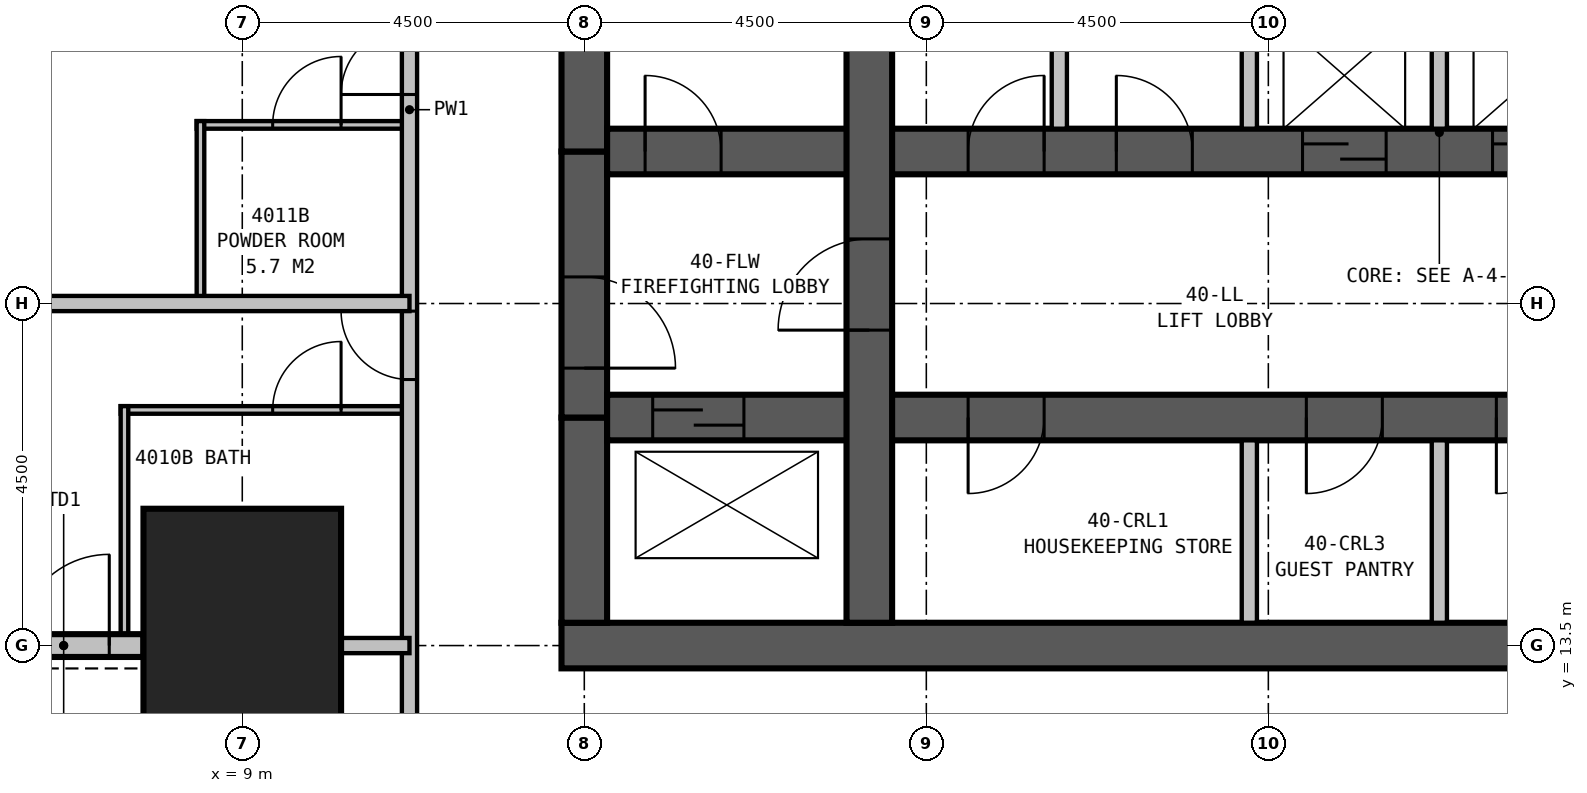
"""IFC4 building model, lengths in metres.
Left out: names, types, materials, properties, quantities, classifications, styles, units other than length and angle.
Written with IfcOpenShell. Run it as: python <this file> out.ifc"""

import sys

from ifc_helpers import new_model, si_unit, direction, frame, frame_2d, origin, origin_2d, place, context, subcontext, project, spatial, rectangle, extrude, element, fill, save


model = new_model("IFC4")
c1 = context("Model", 3, precision=1e-05, world=origin(), true_north=direction((0.0, 1.0)))
c2 = subcontext(c1, "Body", "Model", "MODEL_VIEW")
j1 = project(units=[si_unit("LENGTHUNIT", "METRE"), si_unit("PLANEANGLEUNIT", "RADIAN")], contexts=[c1])
p1 = place(None, origin())
s1 = spatial("IfcSite", under=j1, at=p1, CompositionType="ELEMENT")
p2 = place(p1, origin())
s2 = spatial("IfcBuilding", under=s1, at=p2, CompositionType="ELEMENT")
p3 = place(p2, frame((0.0, 0.0, 157.9)))
s3 = spatial("IfcBuildingStorey", under=s2, at=p3, CompositionType="ELEMENT", Elevation=157.9)
p4 = place(p3, frame((9.0, 13.5, 0.0), z_axis=(0.0, 0.0, 1.0), x_axis=(1.0, 0.0, 0.0)))
e1 = element("IfcColumn", 1, at=p4, inside=s3, PredefinedType="COLUMN", context=c2, shape_type="SweptSolid", body=[
    extrude(rectangle(XDim=2.6, YDim=3.6, at=origin_2d()), origin(), (0.0, 0.0, 1.0), 4.5),
])
p5 = place(p3, frame((13.2, 13.5, 0.0), z_axis=(0.0, 0.0, 1.0), x_axis=(1.0, 0.0, 0.0)))
e2 = element("IfcWall", 2, at=p5, inside=s3, PredefinedType="SHEAR", context=c2, shape_type="SweptSolid", body=[
    extrude(rectangle(XDim=23.1, YDim=0.6, at=frame_2d((11.55, 0.0))), origin(), (0.0, 0.0, 1.0), 4.5),
])
p6 = place(p3, frame((17.25, 13.8, 0.0), z_axis=(0.0, 0.0, 1.0), x_axis=(0.0, 1.0, 0.0)))
e3 = element("IfcWall", 3, at=p6, inside=s3, PredefinedType="SHEAR", context=c2, shape_type="SweptSolid", body=[
    extrude(rectangle(XDim=12.9, YDim=0.6, at=frame_2d((6.45, 0.0))), origin(), (0.0, 0.0, 1.0), 4.5),
])
p7 = place(p6, frame((3.85, 0.0, 0.0)))
e4 = element("IfcOpeningElement", 4, at=p7, cuts=e3, PredefinedType="OPENING", context=c2, shape_type="SweptSolid", body=[
    extrude(rectangle(XDim=1.2, YDim=2.1, at=frame_2d((0.6, 1.05))), frame((0.0, 0.31, 0.0), z_axis=(0.0, -1.0, 0.0), x_axis=(1.0, 0.0, 0.0)), (0.0, 0.0, 1.0), 0.62),
])
p8 = place(p3, frame((13.8, 16.5, 0.0), z_axis=(0.0, 0.0, 1.0), x_axis=(1.0, 0.0, 0.0)))
e5 = element("IfcWall", 5, at=p8, inside=s3, PredefinedType="SHEAR", context=c2, shape_type="SweptSolid", body=[
    extrude(rectangle(XDim=21.9, YDim=0.6, at=frame_2d((10.95, 0.0))), origin(), (0.0, 0.0, 1.0), 4.5),
])
p9 = place(p8, frame((5.75, 0.0, 0.0), z_axis=(0.0, 0.0, 1.0), x_axis=(-1.0, 0.0, 0.0)))
e6 = element("IfcOpeningElement", 6, at=p9, cuts=e5, PredefinedType="OPENING", context=c2, shape_type="SweptSolid", body=[
    extrude(rectangle(XDim=1.0, YDim=2.1, at=frame_2d((0.5, 1.05))), frame((0.0, 0.31, 0.0), z_axis=(0.0, -1.0, 0.0), x_axis=(1.0, 0.0, 0.0)), (0.0, 0.0, 1.0), 0.62),
])
p10 = place(p8, frame((10.2, 0.0, 0.0), z_axis=(0.0, 0.0, 1.0), x_axis=(-1.0, 0.0, 0.0)))
e7 = element("IfcOpeningElement", 7, at=p10, cuts=e5, PredefinedType="OPENING", context=c2, shape_type="SweptSolid", body=[
    extrude(rectangle(XDim=1.0, YDim=2.1, at=frame_2d((0.5, 1.05))), frame((0.0, 0.31, 0.0), z_axis=(0.0, -1.0, 0.0), x_axis=(1.0, 0.0, 0.0)), (0.0, 0.0, 1.0), 0.62),
])
p11 = place(p8, frame((12.7, 0.0, 0.0), z_axis=(0.0, 0.0, 1.0), x_axis=(-1.0, 0.0, 0.0)))
e8 = element("IfcOpeningElement", 8, at=p11, cuts=e5, PredefinedType="OPENING", context=c2, shape_type="SweptSolid", body=[
    extrude(rectangle(XDim=1.0, YDim=2.1, at=frame_2d((0.5, 1.05))), frame((0.0, 0.31, 0.0), z_axis=(0.0, -1.0, 0.0), x_axis=(1.0, 0.0, 0.0)), (0.0, 0.0, 1.0), 0.62),
])
p12 = place(p8, frame((17.15, 0.0, 0.0), z_axis=(0.0, 0.0, 1.0), x_axis=(-1.0, 0.0, 0.0)))
e9 = element("IfcOpeningElement", 9, at=p12, cuts=e5, PredefinedType="OPENING", context=c2, shape_type="SweptSolid", body=[
    extrude(rectangle(XDim=1.0, YDim=2.1, at=frame_2d((0.5, 1.05))), frame((0.0, 0.31, 0.0), z_axis=(0.0, -1.0, 0.0), x_axis=(1.0, 0.0, 0.0)), (0.0, 0.0, 1.0), 0.62),
])
p13 = place(p8, frame((0.6, 0.0, 0.0)))
e10 = element("IfcOpeningElement", 10, at=p13, cuts=e5, PredefinedType="OPENING", context=c2, shape_type="SweptSolid", body=[
    extrude(rectangle(XDim=1.2, YDim=2.1, at=frame_2d((0.6, 1.05))), frame((0.0, 0.31, 0.0), z_axis=(0.0, -1.0, 0.0), x_axis=(1.0, 0.0, 0.0)), (0.0, 0.0, 1.0), 0.62),
])
p14 = place(p8, frame((19.6, 0.0, 0.0)))
e11 = element("IfcOpeningElement", 11, at=p14, cuts=e5, PredefinedType="OPENING", context=c2, shape_type="SweptSolid", body=[
    extrude(rectangle(XDim=1.2, YDim=2.1, at=frame_2d((0.6, 1.05))), frame((0.0, 0.31, 0.0), z_axis=(0.0, -1.0, 0.0), x_axis=(1.0, 0.0, 0.0)), (0.0, 0.0, 1.0), 0.62),
])
p15 = place(p3, frame((13.8, 20.0, 0.0), z_axis=(0.0, 0.0, 1.0), x_axis=(1.0, 0.0, 0.0)))
e12 = element("IfcWall", 12, at=p15, inside=s3, PredefinedType="SHEAR", context=c2, shape_type="SweptSolid", body=[
    extrude(rectangle(XDim=21.9, YDim=0.6, at=frame_2d((10.95, 0.0))), origin(), (0.0, 0.0, 1.0), 4.5),
])
p16 = place(p15, frame((0.5, 0.0, 0.0)))
e13 = element("IfcOpeningElement", 13, at=p16, cuts=e12, PredefinedType="OPENING", context=c2, shape_type="SweptSolid", body=[
    extrude(rectangle(XDim=1.0, YDim=2.1, at=frame_2d((0.5, 1.05))), frame((0.0, 0.31, 0.0), z_axis=(0.0, -1.0, 0.0), x_axis=(1.0, 0.0, 0.0)), (0.0, 0.0, 1.0), 0.62),
])
p17 = place(p15, frame((20.5, 0.0, 0.0)))
e14 = element("IfcOpeningElement", 14, at=p17, cuts=e12, PredefinedType="OPENING", context=c2, shape_type="SweptSolid", body=[
    extrude(rectangle(XDim=1.0, YDim=2.1, at=frame_2d((0.5, 1.05))), frame((0.0, 0.31, 0.0), z_axis=(0.0, -1.0, 0.0), x_axis=(1.0, 0.0, 0.0)), (0.0, 0.0, 1.0), 0.62),
])
p18 = place(p15, frame((9.15, 0.0, 0.0)))
e15 = element("IfcOpeningElement", 15, at=p18, cuts=e12, PredefinedType="OPENING", context=c2, shape_type="SweptSolid", body=[
    extrude(rectangle(XDim=1.1, YDim=2.1, at=frame_2d((0.55, 1.05))), frame((0.0, 0.31, 0.0), z_axis=(0.0, -1.0, 0.0), x_axis=(1.0, 0.0, 0.0)), (0.0, 0.0, 1.0), 0.62),
])
p19 = place(p15, frame((11.65, 0.0, 0.0)))
e16 = element("IfcOpeningElement", 16, at=p19, cuts=e12, PredefinedType="OPENING", context=c2, shape_type="SweptSolid", body=[
    extrude(rectangle(XDim=1.1, YDim=2.1, at=frame_2d((0.55, 1.05))), frame((0.0, 0.31, 0.0), z_axis=(0.0, -1.0, 0.0), x_axis=(1.0, 0.0, 0.0)), (0.0, 0.0, 1.0), 0.62),
])
p20 = place(p15, frame((14.15, 0.0, 0.0)))
e17 = element("IfcOpeningElement", 17, at=p20, cuts=e12, PredefinedType="OPENING", context=c2, shape_type="SweptSolid", body=[
    extrude(rectangle(XDim=1.1, YDim=2.1, at=frame_2d((0.55, 1.05))), frame((0.0, 0.31, 0.0), z_axis=(0.0, -1.0, 0.0), x_axis=(1.0, 0.0, 0.0)), (0.0, 0.0, 1.0), 0.62),
])
p21 = place(p15, frame((16.65, 0.0, 0.0)))
e18 = element("IfcOpeningElement", 18, at=p21, cuts=e12, PredefinedType="OPENING", context=c2, shape_type="SweptSolid", body=[
    extrude(rectangle(XDim=1.1, YDim=2.1, at=frame_2d((0.55, 1.05))), frame((0.0, 0.31, 0.0), z_axis=(0.0, -1.0, 0.0), x_axis=(1.0, 0.0, 0.0)), (0.0, 0.0, 1.0), 0.62),
])
p22 = place(p15, frame((4.75, 0.0, 0.0)))
e19 = element("IfcOpeningElement", 19, at=p22, cuts=e12, PredefinedType="OPENING", context=c2, shape_type="SweptSolid", body=[
    extrude(rectangle(XDim=1.0, YDim=2.1, at=frame_2d((0.5, 1.05))), frame((0.0, 0.31, 0.0), z_axis=(0.0, -1.0, 0.0), x_axis=(1.0, 0.0, 0.0)), (0.0, 0.0, 1.0), 0.62),
])
p23 = place(p15, frame((6.7, 0.0, 0.0)))
e20 = element("IfcOpeningElement", 20, at=p23, cuts=e12, PredefinedType="OPENING", context=c2, shape_type="SweptSolid", body=[
    extrude(rectangle(XDim=1.0, YDim=2.1, at=frame_2d((0.5, 1.05))), frame((0.0, 0.31, 0.0), z_axis=(0.0, -1.0, 0.0), x_axis=(1.0, 0.0, 0.0)), (0.0, 0.0, 1.0), 0.62),
])
p24 = place(p3, frame((13.5, 26.7, 0.0), z_axis=(0.0, 0.0, 1.0), x_axis=(0.0, -1.0, 0.0)))
e21 = element("IfcWall", 21, at=p24, inside=s3, PredefinedType="SHEAR", context=c2, shape_type="SweptSolid", body=[
    extrude(rectangle(XDim=6.7, YDim=0.6, at=frame_2d((3.35, 0.0))), origin(), (0.0, 0.0, 1.0), 4.5),
])
p25 = place(p3, frame((13.5, 20.0, 0.0), z_axis=(0.0, 0.0, 1.0), x_axis=(0.0, -1.0, 0.0)))
e22 = element("IfcWall", 22, at=p25, inside=s3, PredefinedType="SHEAR", context=c2, shape_type="SweptSolid", body=[
    extrude(rectangle(XDim=3.5, YDim=0.6, at=frame_2d((1.75, 0.0))), origin(), (0.0, 0.0, 1.0), 4.5),
])
p26 = place(p25, frame((1.65, 0.0, 0.0)))
e23 = element("IfcOpeningElement", 23, at=p26, cuts=e22, PredefinedType="OPENING", context=c2, shape_type="SweptSolid", body=[
    extrude(rectangle(XDim=1.2, YDim=2.1, at=frame_2d((0.6, 1.05))), frame((0.0, 0.31, 0.0), z_axis=(0.0, -1.0, 0.0), x_axis=(1.0, 0.0, 0.0)), (0.0, 0.0, 1.0), 0.62),
])
p27 = place(p3, frame((13.5, 16.5, 0.0), z_axis=(0.0, 0.0, 1.0), x_axis=(0.0, -1.0, 0.0)))
e24 = element("IfcWall", 24, at=p27, inside=s3, PredefinedType="SHEAR", context=c2, shape_type="SweptSolid", body=[
    extrude(rectangle(XDim=2.7, YDim=0.6, at=frame_2d((1.35, 0.0))), origin(), (0.0, 0.0, 1.0), 4.5),
])
p28 = place(p3, frame((5.6, 13.5, 0.0), z_axis=(0.0, 0.0, 1.0), x_axis=(1.0, 0.0, 0.0)))
e25 = element("IfcWall", 25, at=p28, inside=s3, PredefinedType="STANDARD", context=c2, shape_type="SweptSolid", body=[
    extrude(rectangle(XDim=2.1, YDim=0.3, at=frame_2d((1.05, 0.0))), origin(), (0.0, 0.0, 1.0), 2.75),
])
p29 = place(p28, frame((0.45, 0.0, 0.0)))
e26 = element("IfcOpeningElement", 26, at=p29, cuts=e25, PredefinedType="OPENING", context=c2, shape_type="SweptSolid", body=[
    extrude(rectangle(XDim=1.2, YDim=2.4, at=frame_2d((0.6, 1.2))), frame((0.0, 0.16, 0.0), z_axis=(0.0, -1.0, 0.0), x_axis=(1.0, 0.0, 0.0)), (0.0, 0.0, 1.0), 0.32),
])
p30 = place(p3, frame((11.2, 11.2, 0.0), z_axis=(0.0, 0.0, 1.0), x_axis=(0.0, 1.0, 0.0)))
e27 = element("IfcWall", 27, at=p30, inside=s3, PredefinedType="PARTITIONING", context=c2, shape_type="SweptSolid", body=[
    extrude(rectangle(XDim=18.7, YDim=0.2, at=frame_2d((9.35, 0.0))), origin(), (0.0, 0.0, 1.0), 4.25),
])
p31 = place(p30, frame((5.8, 0.0, 0.0)))
e28 = element("IfcOpeningElement", 28, at=p31, cuts=e27, PredefinedType="OPENING", context=c2, shape_type="SweptSolid", body=[
    extrude(rectangle(XDim=0.9, YDim=2.1, at=frame_2d((0.45, 1.05))), frame((0.0, 0.11, 0.0), z_axis=(0.0, -1.0, 0.0), x_axis=(1.0, 0.0, 0.0)), (0.0, 0.0, 1.0), 0.22),
])
p32 = place(p30, frame((9.55, 0.0, 0.0)))
e29 = element("IfcOpeningElement", 29, at=p32, cuts=e27, PredefinedType="OPENING", context=c2, shape_type="SweptSolid", body=[
    extrude(rectangle(XDim=0.9, YDim=2.1, at=frame_2d((0.45, 1.05))), frame((0.0, 0.11, 0.0), z_axis=(0.0, -1.0, 0.0), x_axis=(1.0, 0.0, 0.0)), (0.0, 0.0, 1.0), 0.22),
])
p33 = place(p3, frame((11.2, 18.0, 0.0), z_axis=(0.0, 0.0, 1.0), x_axis=(-1.0, 0.0, 0.0)))
e30 = element("IfcWall", 30, at=p33, inside=s3, PredefinedType="PARTITIONING", context=c2, shape_type="SweptSolid", body=[
    extrude(rectangle(XDim=9.199, YDim=0.2, at=frame_2d((4.6, 0.0))), origin(), (0.0, 0.0, 1.0), 3.25),
])
p34 = place(p3, frame((7.45, 13.5, 0.0), z_axis=(0.0, 0.0, 1.0), x_axis=(0.0, 1.0, 0.0)))
e31 = element("IfcWall", 31, at=p34, inside=s3, PredefinedType="PLUMBINGWALL", context=c2, shape_type="SweptSolid", body=[
    extrude(rectangle(XDim=3.15, YDim=0.1, at=frame_2d((1.575, 0.0))), origin(), (0.0, 0.0, 1.0), 4.25),
])
p35 = place(p3, frame((11.2, 16.6, 0.0), z_axis=(0.0, 0.0, 1.0), x_axis=(-1.0, 0.0, 0.0)))
e32 = element("IfcWall", 32, at=p35, inside=s3, PredefinedType="PLUMBINGWALL", context=c2, shape_type="SweptSolid", body=[
    extrude(rectangle(XDim=3.8, YDim=0.1, at=frame_2d((1.9, 0.0))), origin(), (0.0, 0.0, 1.0), 4.25),
])
p36 = place(p35, frame((1.8, 0.0, 0.0), z_axis=(0.0, 0.0, 1.0), x_axis=(-1.0, 0.0, 0.0)))
e33 = element("IfcOpeningElement", 33, at=p36, cuts=e32, PredefinedType="OPENING", context=c2, shape_type="SweptSolid", body=[
    extrude(rectangle(XDim=0.9, YDim=2.1, at=frame_2d((0.45, 1.05))), frame((0.0, 0.06, 0.0), z_axis=(0.0, -1.0, 0.0), x_axis=(1.0, 0.0, 0.0)), (0.0, 0.0, 1.0), 0.12),
])
p37 = place(p3, frame((8.45, 18.0, 0.0), z_axis=(0.0, 0.0, 1.0), x_axis=(0.0, 1.0, 0.0)))
e34 = element("IfcWall", 34, at=p37, inside=s3, PredefinedType="PLUMBINGWALL", context=c2, shape_type="SweptSolid", body=[
    extrude(rectangle(XDim=2.4, YDim=0.1, at=frame_2d((1.2, 0.0))), origin(), (0.0, 0.0, 1.0), 4.25),
])
p38 = place(p3, frame((11.2, 20.35, 0.0), z_axis=(0.0, 0.0, 1.0), x_axis=(-1.0, 0.0, 0.0)))
e35 = element("IfcWall", 35, at=p38, inside=s3, PredefinedType="PLUMBINGWALL", context=c2, shape_type="SweptSolid", body=[
    extrude(rectangle(XDim=2.8, YDim=0.1, at=frame_2d((1.4, 0.0))), origin(), (0.0, 0.0, 1.0), 4.25),
])
p39 = place(p38, frame((1.8, 0.0, 0.0), z_axis=(0.0, 0.0, 1.0), x_axis=(-1.0, 0.0, 0.0)))
e36 = element("IfcOpeningElement", 36, at=p39, cuts=e35, PredefinedType="OPENING", context=c2, shape_type="SweptSolid", body=[
    extrude(rectangle(XDim=0.9, YDim=2.1, at=frame_2d((0.45, 1.05))), frame((0.0, 0.06, 0.0), z_axis=(0.0, -1.0, 0.0), x_axis=(1.0, 0.0, 0.0)), (0.0, 0.0, 1.0), 0.12),
])
p40 = place(p3, frame((11.2, 13.5, 0.0), z_axis=(0.0, 0.0, 1.0), x_axis=(-1.0, 0.0, 0.0)))
e37 = element("IfcWall", 37, at=p40, inside=s3, PredefinedType="PARTITIONING", context=c2, shape_type="SweptSolid", body=[
    extrude(rectangle(XDim=2.2, YDim=0.2, at=frame_2d((1.1, 0.0))), origin(), (0.0, 0.0, 1.0), 2.95),
])
p41 = place(p3, frame((19.75, 20.3, 0.0), z_axis=(0.0, 0.0, 1.0), x_axis=(0.0, 1.0, 0.0)))
e38 = element("IfcWall", 38, at=p41, inside=s3, PredefinedType="PARTITIONING", context=c2, shape_type="SweptSolid", body=[
    extrude(rectangle(XDim=3.1, YDim=0.2, at=frame_2d((1.55, 0.0))), origin(), (0.0, 0.0, 1.0), 4.25),
])
p42 = place(p3, frame((22.25, 13.8, 0.0), z_axis=(0.0, 0.0, 1.0), x_axis=(0.0, 1.0, 0.0)))
e39 = element("IfcWall", 39, at=p42, inside=s3, PredefinedType="PARTITIONING", context=c2, shape_type="SweptSolid", body=[
    extrude(rectangle(XDim=2.4, YDim=0.2, at=frame_2d((1.2, 0.0))), origin(), (0.0, 0.0, 1.0), 4.25),
])
p43 = place(p3, frame((22.25, 20.3, 0.0), z_axis=(0.0, 0.0, 1.0), x_axis=(0.0, 1.0, 0.0)))
e40 = element("IfcWall", 40, at=p43, inside=s3, PredefinedType="PARTITIONING", context=c2, shape_type="SweptSolid", body=[
    extrude(rectangle(XDim=3.1, YDim=0.2, at=frame_2d((1.55, 0.0))), origin(), (0.0, 0.0, 1.0), 4.25),
])
p44 = place(p3, frame((24.75, 13.8, 0.0), z_axis=(0.0, 0.0, 1.0), x_axis=(0.0, 1.0, 0.0)))
e41 = element("IfcWall", 41, at=p44, inside=s3, PredefinedType="PARTITIONING", context=c2, shape_type="SweptSolid", body=[
    extrude(rectangle(XDim=2.4, YDim=0.2, at=frame_2d((1.2, 0.0))), origin(), (0.0, 0.0, 1.0), 4.25),
])
p45 = place(p3, frame((24.75, 20.3, 0.0), z_axis=(0.0, 0.0, 1.0), x_axis=(0.0, 1.0, 0.0)))
e42 = element("IfcWall", 42, at=p45, inside=s3, PredefinedType="PARTITIONING", context=c2, shape_type="SweptSolid", body=[
    extrude(rectangle(XDim=3.1, YDim=0.2, at=frame_2d((1.55, 0.0))), origin(), (0.0, 0.0, 1.0), 4.25),
])
p46 = place(p29, origin())
e43 = element("IfcDoor", 43, at=p46, inside=s3, OperationType="SINGLE_SWING_RIGHT", PredefinedType="DOOR", context=c2, shape_type="SweptSolid", body=[
    extrude(rectangle(XDim=1.2, YDim=2.4, at=frame_2d((0.6, 1.2))), frame((0.0, 0.025, 0.0), z_axis=(0.0, -1.0, 0.0), x_axis=(1.0, 0.0, 0.0)), (0.0, 0.0, 1.0), 0.05),
])
fill(e26, e43)
p47 = place(p31, origin())
e44 = element("IfcDoor", 44, at=p47, inside=s3, OperationType="SINGLE_SWING_RIGHT", PredefinedType="DOOR", context=c2, shape_type="SweptSolid", body=[
    extrude(rectangle(XDim=0.9, YDim=2.1, at=frame_2d((0.45, 1.05))), frame((0.0, 0.025, 0.0), z_axis=(0.0, -1.0, 0.0), x_axis=(1.0, 0.0, 0.0)), (0.0, 0.0, 1.0), 0.05),
])
fill(e28, e44)
p48 = place(p32, origin())
e45 = element("IfcDoor", 45, at=p48, inside=s3, OperationType="SINGLE_SWING_LEFT", PredefinedType="DOOR", context=c2, shape_type="SweptSolid", body=[
    extrude(rectangle(XDim=0.9, YDim=2.1, at=frame_2d((0.45, 1.05))), frame((0.0, 0.025, 0.0), z_axis=(0.0, -1.0, 0.0), x_axis=(1.0, 0.0, 0.0)), (0.0, 0.0, 1.0), 0.05),
])
fill(e29, e45)
p49 = place(p36, origin())
e46 = element("IfcDoor", 46, at=p49, inside=s3, OperationType="SINGLE_SWING_RIGHT", PredefinedType="DOOR", context=c2, shape_type="SweptSolid", body=[
    extrude(rectangle(XDim=0.9, YDim=2.1, at=frame_2d((0.45, 1.05))), frame((0.0, 0.025, 0.0), z_axis=(0.0, -1.0, 0.0), x_axis=(1.0, 0.0, 0.0)), (0.0, 0.0, 1.0), 0.05),
])
fill(e33, e46)
p50 = place(p39, origin())
e47 = element("IfcDoor", 47, at=p50, inside=s3, OperationType="SINGLE_SWING_RIGHT", PredefinedType="DOOR", context=c2, shape_type="SweptSolid", body=[
    extrude(rectangle(XDim=0.9, YDim=2.1, at=frame_2d((0.45, 1.05))), frame((0.0, 0.025, 0.0), z_axis=(0.0, -1.0, 0.0), x_axis=(1.0, 0.0, 0.0)), (0.0, 0.0, 1.0), 0.05),
])
fill(e36, e47)
p51 = place(p26, origin())
e48 = element("IfcDoor", 48, at=p51, inside=s3, OperationType="SINGLE_SWING_RIGHT", PredefinedType="DOOR", context=c2, shape_type="SweptSolid", body=[
    extrude(rectangle(XDim=1.2, YDim=2.1, at=frame_2d((0.6, 1.05))), frame((0.0, 0.3, 0.0), z_axis=(0.0, -1.0, 0.0), x_axis=(1.0, 0.0, 0.0)), (0.0, 0.0, 1.0), 0.6),
])
fill(e23, e48)
p52 = place(p7, origin())
e49 = element("IfcDoor", 49, at=p52, inside=s3, OperationType="SINGLE_SWING_LEFT", PredefinedType="DOOR", context=c2, shape_type="SweptSolid", body=[
    extrude(rectangle(XDim=1.2, YDim=2.1, at=frame_2d((0.6, 1.05))), frame((0.0, 0.3, 0.0), z_axis=(0.0, -1.0, 0.0), x_axis=(1.0, 0.0, 0.0)), (0.0, 0.0, 1.0), 0.6),
])
fill(e4, e49)
p53 = place(p16, origin())
e50 = element("IfcDoor", 50, at=p53, inside=s3, OperationType="SINGLE_SWING_LEFT", PredefinedType="DOOR", context=c2, shape_type="SweptSolid", body=[
    extrude(rectangle(XDim=1.0, YDim=2.1, at=frame_2d((0.5, 1.05))), frame((0.0, 0.3, 0.0), z_axis=(0.0, -1.0, 0.0), x_axis=(1.0, 0.0, 0.0)), (0.0, 0.0, 1.0), 0.6),
])
fill(e13, e50)
p54 = place(p18, origin())
e51 = element("IfcDoor", 51, at=p54, inside=s3, OperationType="SLIDING_TO_LEFT", PredefinedType="DOOR", context=c2, shape_type="SweptSolid", body=[
    extrude(rectangle(XDim=1.1, YDim=2.1, at=frame_2d((0.55, 1.05))), frame((0.0, 0.3, 0.0), z_axis=(0.0, -1.0, 0.0), x_axis=(1.0, 0.0, 0.0)), (0.0, 0.0, 1.0), 0.6),
])
fill(e15, e51)
p55 = place(p19, origin())
e52 = element("IfcDoor", 52, at=p55, inside=s3, OperationType="SLIDING_TO_LEFT", PredefinedType="DOOR", context=c2, shape_type="SweptSolid", body=[
    extrude(rectangle(XDim=1.1, YDim=2.1, at=frame_2d((0.55, 1.05))), frame((0.0, 0.3, 0.0), z_axis=(0.0, -1.0, 0.0), x_axis=(1.0, 0.0, 0.0)), (0.0, 0.0, 1.0), 0.6),
])
fill(e16, e52)
p56 = place(p9, origin())
e53 = element("IfcDoor", 53, at=p56, inside=s3, OperationType="SINGLE_SWING_RIGHT", PredefinedType="DOOR", context=c2, shape_type="SweptSolid", body=[
    extrude(rectangle(XDim=1.0, YDim=2.1, at=frame_2d((0.5, 1.05))), frame((0.0, 0.3, 0.0), z_axis=(0.0, -1.0, 0.0), x_axis=(1.0, 0.0, 0.0)), (0.0, 0.0, 1.0), 0.6),
])
fill(e6, e53)
p57 = place(p10, origin())
e54 = element("IfcDoor", 54, at=p57, inside=s3, OperationType="SINGLE_SWING_RIGHT", PredefinedType="DOOR", context=c2, shape_type="SweptSolid", body=[
    extrude(rectangle(XDim=1.0, YDim=2.1, at=frame_2d((0.5, 1.05))), frame((0.0, 0.3, 0.0), z_axis=(0.0, -1.0, 0.0), x_axis=(1.0, 0.0, 0.0)), (0.0, 0.0, 1.0), 0.6),
])
fill(e7, e54)
p58 = place(p11, origin())
e55 = element("IfcDoor", 55, at=p58, inside=s3, OperationType="SINGLE_SWING_RIGHT", PredefinedType="DOOR", context=c2, shape_type="SweptSolid", body=[
    extrude(rectangle(XDim=1.0, YDim=2.1, at=frame_2d((0.5, 1.05))), frame((0.0, 0.3, 0.0), z_axis=(0.0, -1.0, 0.0), x_axis=(1.0, 0.0, 0.0)), (0.0, 0.0, 1.0), 0.6),
])
fill(e8, e55)
p59 = place(p22, origin())
e56 = element("IfcDoor", 56, at=p59, inside=s3, OperationType="SINGLE_SWING_RIGHT", PredefinedType="DOOR", context=c2, shape_type="SweptSolid", body=[
    extrude(rectangle(XDim=1.0, YDim=2.1, at=frame_2d((0.5, 1.05))), frame((0.0, 0.3, 0.0), z_axis=(0.0, -1.0, 0.0), x_axis=(1.0, 0.0, 0.0)), (0.0, 0.0, 1.0), 0.6),
])
fill(e19, e56)
p60 = place(p23, origin())
e57 = element("IfcDoor", 57, at=p60, inside=s3, OperationType="SINGLE_SWING_LEFT", PredefinedType="DOOR", context=c2, shape_type="SweptSolid", body=[
    extrude(rectangle(XDim=1.0, YDim=2.1, at=frame_2d((0.5, 1.05))), frame((0.0, 0.3, 0.0), z_axis=(0.0, -1.0, 0.0), x_axis=(1.0, 0.0, 0.0)), (0.0, 0.0, 1.0), 0.6),
])
fill(e20, e57)
p61 = place(p13, origin())
e58 = element("IfcDoor", 58, at=p61, inside=s3, OperationType="SLIDING_TO_LEFT", PredefinedType="DOOR", context=c2, shape_type="SweptSolid", body=[
    extrude(rectangle(XDim=1.2, YDim=2.1, at=frame_2d((0.6, 1.05))), frame((0.0, 0.3, 0.0), z_axis=(0.0, -1.0, 0.0), x_axis=(1.0, 0.0, 0.0)), (0.0, 0.0, 1.0), 0.6),
])
fill(e10, e58)
save(model, sys.argv[1])
